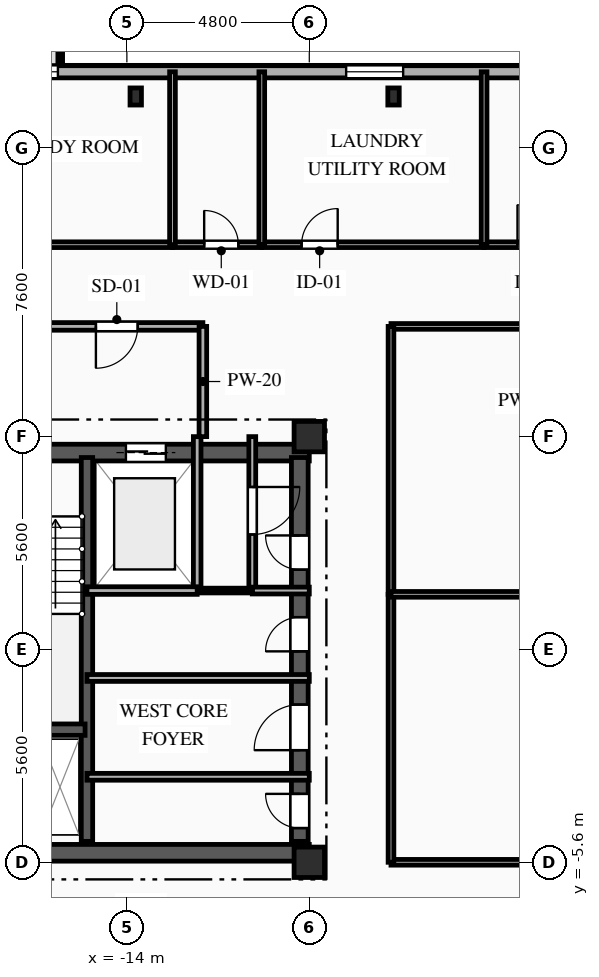
"""IFC4 building model, lengths in metres.
Left out: names, types, materials, properties, quantities, classifications, styles, units other than length and angle.
Written with IfcOpenShell. Run it as: python <this file> out.ifc"""

import sys

from ifc_helpers import new_model, si_unit, direction, frame, frame_2d, origin, origin_2d, place, context, subcontext, project, spatial, rectangle, i_section, extrude, element, fill, save


model = new_model("IFC4")
c1 = context("Model", 3, precision=1e-05, world=origin(), true_north=direction((0.0, 1.0)))
c2 = subcontext(c1, "Body", "Model", "MODEL_VIEW")
j1 = project(units=[si_unit("LENGTHUNIT", "METRE"), si_unit("PLANEANGLEUNIT", "RADIAN")], contexts=[c1])
p1 = place(None, origin())
s1 = spatial("IfcSite", under=j1, at=p1, CompositionType="ELEMENT")
p2 = place(p1, origin())
s2 = spatial("IfcBuilding", under=s1, at=p2, CompositionType="ELEMENT")
p3 = place(p2, frame((0.0, 0.0, 255.1)))
s3 = spatial("IfcBuildingStorey", under=s2, at=p3, CompositionType="ELEMENT", Elevation=255.1)
for number, where, z_axis, x_axis in (
    (1, (-9.2, -5.6, 0.0), (0.0, 0.0, 1.0), (1.0, 0.0, 0.0)),
    (2, (-9.2, 5.6, 0.0), (0.0, 0.0, 1.0), (1.0, 0.0, 0.0)),
):
    element("IfcColumn", number, at=place(p3, frame(where, z_axis=z_axis, x_axis=x_axis)), inside=s3, PredefinedType="COLUMN", context=c2, shape_type="SweptSolid", body=[
        extrude(rectangle(XDim=0.8, YDim=0.8, at=origin_2d()), origin(), (0.0, 0.0, 1.0), 3.35),
    ])
for number, where, z_axis, x_axis in (
    (3, (-6.983, 14.55, 0.0), (0.0, 0.0, 1.0), (1.0, 0.0, 0.0)),
    (4, (-13.767, 14.55, 0.0), (0.0, 0.0, 1.0), (1.0, 0.0, 0.0)),
):
    element("IfcColumn", number, at=place(p3, frame(where, z_axis=z_axis, x_axis=x_axis)), inside=s3, PredefinedType="COLUMN", context=c2, shape_type="SweptSolid", body=[
        extrude(i_section(OverallWidth=0.3, OverallDepth=0.45, WebThickness=0.014, FlangeThickness=0.026, FilletRadius=0.027, at=origin_2d()), origin(), (0.0, 0.0, 1.0), 3.35),
    ])
p4 = place(p3, frame((-21.2, 15.2, 0.0), z_axis=(0.0, 0.0, 1.0), x_axis=(1.0, 0.0, 0.0)))
e5 = element("IfcWall", 5, at=p4, inside=s3, PredefinedType="SOLIDWALL", context=c2, shape_type="SweptSolid", body=[
    extrude(rectangle(XDim=42.0, YDim=0.32, at=frame_2d((21.0, 0.0))), origin(), (0.0, 0.0, 1.0), 3.04),
])
p5 = place(p4, frame((3.735, 0.0, 0.85)))
e6 = element("IfcOpeningElement", 6, at=p5, cuts=e5, PredefinedType="OPENING", context=c2, shape_type="SweptSolid", body=[
    extrude(rectangle(XDim=1.65, YDim=1.85, at=frame_2d((0.825, 0.925))), frame((0.0, 0.17, 0.0), z_axis=(0.0, -1.0, 0.0), x_axis=(1.0, 0.0, 0.0)), (0.0, 0.0, 1.0), 0.34),
])
p6 = place(p4, frame((12.97, 0.0, 0.85)))
e7 = element("IfcOpeningElement", 7, at=p6, cuts=e5, PredefinedType="OPENING", context=c2, shape_type="SweptSolid", body=[
    extrude(rectangle(XDim=1.5, YDim=1.85, at=frame_2d((0.75, 0.925))), frame((0.0, 0.17, 0.0), z_axis=(0.0, -1.0, 0.0), x_axis=(1.0, 0.0, 0.0)), (0.0, 0.0, 1.0), 0.34),
])
p7 = place(p4, frame((19.895, 0.0, 0.85)))
e8 = element("IfcOpeningElement", 8, at=p7, cuts=e5, PredefinedType="OPENING", context=c2, shape_type="SweptSolid", body=[
    extrude(rectangle(XDim=1.65, YDim=1.85, at=frame_2d((0.825, 0.925))), frame((0.0, 0.17, 0.0), z_axis=(0.0, -1.0, 0.0), x_axis=(1.0, 0.0, 0.0)), (0.0, 0.0, 1.0), 0.34),
])
p8 = place(p4, frame((28.095, 0.0, 0.85)))
e9 = element("IfcOpeningElement", 9, at=p8, cuts=e5, PredefinedType="OPENING", context=c2, shape_type="SweptSolid", body=[
    extrude(rectangle(XDim=1.65, YDim=1.85, at=frame_2d((0.825, 0.925))), frame((0.0, 0.17, 0.0), z_axis=(0.0, -1.0, 0.0), x_axis=(1.0, 0.0, 0.0)), (0.0, 0.0, 1.0), 0.34),
])
p9 = place(p4, frame((36.495, 0.0, 0.85)))
e10 = element("IfcOpeningElement", 10, at=p9, cuts=e5, PredefinedType="OPENING", context=c2, shape_type="SweptSolid", body=[
    extrude(rectangle(XDim=1.65, YDim=1.85, at=frame_2d((0.825, 0.925))), frame((0.0, 0.17, 0.0), z_axis=(0.0, -1.0, 0.0), x_axis=(1.0, 0.0, 0.0)), (0.0, 0.0, 1.0), 0.34),
])
p10 = place(p3, frame((-18.8, 5.18, 0.0), z_axis=(0.0, 0.0, 1.0), x_axis=(1.0, 0.0, 0.0)))
e11 = element("IfcWall", 11, at=p10, inside=s3, PredefinedType="SHEAR", context=c2, shape_type="SweptSolid", body=[
    extrude(rectangle(XDim=9.6, YDim=0.44, at=frame_2d((4.8, 0.0))), origin(), (0.0, 0.0, 1.0), 3.04),
])
p11 = place(p10, frame((1.55, 0.0, 0.0)))
e12 = element("IfcOpeningElement", 12, at=p11, cuts=e11, PredefinedType="OPENING", context=c2, shape_type="SweptSolid", body=[
    extrude(rectangle(XDim=1.1, YDim=2.15, at=frame_2d((0.55, 1.075))), frame((0.0, 0.23, 0.0), z_axis=(0.0, -1.0, 0.0), x_axis=(1.0, 0.0, 0.0)), (0.0, 0.0, 1.0), 0.46),
])
p12 = place(p10, frame((4.775, 0.0, 0.0)))
e13 = element("IfcOpeningElement", 13, at=p12, cuts=e11, PredefinedType="OPENING", context=c2, shape_type="SweptSolid", body=[
    extrude(rectangle(XDim=1.05, YDim=2.1, at=frame_2d((0.525, 1.05))), frame((0.0, 0.23, 0.0), z_axis=(0.0, -1.0, 0.0), x_axis=(1.0, 0.0, 0.0)), (0.0, 0.0, 1.0), 0.46),
])
p13 = place(p3, frame((-18.8, -5.35, 0.0), z_axis=(0.0, 0.0, 1.0), x_axis=(1.0, 0.0, 0.0)))
e14 = element("IfcWall", 14, at=p13, inside=s3, PredefinedType="SHEAR", context=c2, shape_type="SweptSolid", body=[
    extrude(rectangle(XDim=9.6, YDim=0.44, at=frame_2d((4.8, 0.0))), origin(), (0.0, 0.0, 1.0), 3.04),
])
p14 = place(p13, frame((1.05, 0.0, 0.0)))
e15 = element("IfcOpeningElement", 15, at=p14, cuts=e14, PredefinedType="OPENING", context=c2, shape_type="SweptSolid", body=[
    extrude(rectangle(XDim=0.9, YDim=2.1, at=frame_2d((0.45, 1.05))), frame((0.0, 0.23, 0.0), z_axis=(0.0, -1.0, 0.0), x_axis=(1.0, 0.0, 0.0)), (0.0, 0.0, 1.0), 0.46),
])
p15 = place(p3, frame((-9.45, -5.05, 0.0), z_axis=(0.0, 0.0, 1.0), x_axis=(0.0, 1.0, 0.0)))
e16 = element("IfcWall", 16, at=p15, inside=s3, PredefinedType="SHEAR", context=c2, shape_type="SweptSolid", body=[
    extrude(rectangle(XDim=10.1, YDim=0.44, at=frame_2d((5.05, 0.0))), origin(), (0.0, 0.0, 1.0), 3.04),
])
p16 = place(p15, frame((7.15, 0.0, 0.0)))
e17 = element("IfcOpeningElement", 17, at=p16, cuts=e16, PredefinedType="OPENING", context=c2, shape_type="SweptSolid", body=[
    extrude(rectangle(XDim=0.9, YDim=2.1, at=frame_2d((0.45, 1.05))), frame((0.0, 0.23, 0.0), z_axis=(0.0, -1.0, 0.0), x_axis=(1.0, 0.0, 0.0)), (0.0, 0.0, 1.0), 0.46),
])
p17 = place(p15, frame((2.4, 0.0, 0.0)))
e18 = element("IfcOpeningElement", 18, at=p17, cuts=e16, PredefinedType="OPENING", context=c2, shape_type="SweptSolid", body=[
    extrude(rectangle(XDim=1.2, YDim=2.15, at=frame_2d((0.6, 1.075))), frame((0.0, 0.23, 0.0), z_axis=(0.0, -1.0, 0.0), x_axis=(1.0, 0.0, 0.0)), (0.0, 0.0, 1.0), 0.46),
])
p18 = place(p15, frame((0.35, 0.0, 0.0)))
e19 = element("IfcOpeningElement", 19, at=p18, cuts=e16, PredefinedType="OPENING", context=c2, shape_type="SweptSolid", body=[
    extrude(rectangle(XDim=0.9, YDim=2.1, at=frame_2d((0.45, 1.05))), frame((0.0, 0.23, 0.0), z_axis=(0.0, -1.0, 0.0), x_axis=(1.0, 0.0, 0.0)), (0.0, 0.0, 1.0), 0.46),
])
p19 = place(p15, frame((5.0, 0.0, 0.0)))
e20 = element("IfcOpeningElement", 20, at=p19, cuts=e16, PredefinedType="OPENING", context=c2, shape_type="SweptSolid", body=[
    extrude(rectangle(XDim=0.9, YDim=2.1, at=frame_2d((0.45, 1.05))), frame((0.0, 0.23, 0.0), z_axis=(0.0, -1.0, 0.0), x_axis=(1.0, 0.0, 0.0)), (0.0, 0.0, 1.0), 0.46),
])
p20 = place(p3, frame((-15.05, -5.05, 0.0), z_axis=(0.0, 0.0, 1.0), x_axis=(0.0, 1.0, 0.0)))
e21 = element("IfcWall", 21, at=p20, inside=s3, PredefinedType="SHEAR", context=c2, shape_type="SweptSolid", body=[
    extrude(rectangle(XDim=10.1, YDim=0.3, at=frame_2d((5.05, 0.0))), origin(), (0.0, 0.0, 1.0), 3.04),
])
p21 = place(p3, frame((-18.28, -2.11, 0.0), z_axis=(0.0, 0.0, 1.0), x_axis=(1.0, 0.0, 0.0)))
e22 = element("IfcWall", 22, at=p21, inside=s3, PredefinedType="SHEAR", context=c2, shape_type="SweptSolid", body=[
    extrude(rectangle(XDim=3.18, YDim=0.3, at=frame_2d((1.59, 0.0))), origin(), (0.0, 0.0, 1.0), 3.04),
])
p22 = place(p3, frame((-12.15, 1.55, 0.0), z_axis=(0.0, 0.0, 1.0), x_axis=(0.0, 1.0, 0.0)))
e23 = element("IfcWall", 23, at=p22, inside=s3, PredefinedType="PARTITIONING", context=c2, shape_type="SweptSolid", body=[
    extrude(rectangle(XDim=4.05, YDim=0.2, at=frame_2d((2.025, 0.0))), origin(), (0.0, 0.0, 1.0), 3.04),
])
p23 = place(p3, frame((-12.0, 8.5, 0.0), z_axis=(0.0, 0.0, 1.0), x_axis=(-1.0, 0.0, 0.0)))
e24 = element("IfcWall", 24, at=p23, inside=s3, PredefinedType="PARTITIONING", context=c2, shape_type="SweptSolid", body=[
    extrude(rectangle(XDim=6.8, YDim=0.2, at=frame_2d((3.4, 0.0))), origin(), (0.0, 0.0, 1.0), 3.04),
])
p24 = place(p23, frame((1.715, 0.0, 0.0)))
e25 = element("IfcOpeningElement", 25, at=p24, cuts=e24, PredefinedType="OPENING", context=c2, shape_type="SweptSolid", body=[
    extrude(rectangle(XDim=1.1, YDim=2.15, at=frame_2d((0.55, 1.075))), frame((0.0, 0.11, 0.0), z_axis=(0.0, -1.0, 0.0), x_axis=(1.0, 0.0, 0.0)), (0.0, 0.0, 1.0), 0.22),
])
p25 = place(p3, frame((-12.0, 5.6, 0.0), z_axis=(0.0, 0.0, 1.0), x_axis=(0.0, 1.0, 0.0)))
e26 = element("IfcWall", 26, at=p25, inside=s3, PredefinedType="PARTITIONING", context=c2, shape_type="SweptSolid", body=[
    extrude(rectangle(XDim=2.9, YDim=0.2, at=frame_2d((1.45, 0.0))), origin(), (0.0, 0.0, 1.0), 3.04),
])
p26 = place(p3, frame((-10.7, 5.6, 0.0), z_axis=(0.0, 0.0, 1.0), x_axis=(0.0, -1.0, 0.0)))
e27 = element("IfcWall", 27, at=p26, inside=s3, PredefinedType="PARTITIONING", context=c2, shape_type="SweptSolid", body=[
    extrude(rectangle(XDim=4.05, YDim=0.18, at=frame_2d((2.025, 0.0))), origin(), (0.0, 0.0, 1.0), 3.04),
])
p27 = place(p26, frame((1.325, 0.0, 0.0)))
e28 = element("IfcOpeningElement", 28, at=p27, cuts=e27, PredefinedType="OPENING", context=c2, shape_type="SweptSolid", body=[
    extrude(rectangle(XDim=1.25, YDim=2.2, at=frame_2d((0.625, 1.1))), frame((0.0, 0.1, 0.0), z_axis=(0.0, -1.0, 0.0), x_axis=(1.0, 0.0, 0.0)), (0.0, 0.0, 1.0), 0.2),
])
p28 = place(p3, frame((-10.7, 1.55, 0.0), z_axis=(0.0, 0.0, 1.0), x_axis=(1.0, 0.0, 0.0)))
e29 = element("IfcWall", 29, at=p28, inside=s3, PredefinedType="PARTITIONING", context=c2, shape_type="SweptSolid", body=[
    extrude(rectangle(XDim=1.5, YDim=0.18, at=frame_2d((0.75, 0.0))), origin(), (0.0, 0.0, 1.0), 3.04),
])
p29 = place(p3, frame((-12.15, 1.55, 0.0), z_axis=(0.0, 0.0, 1.0), x_axis=(1.0, 0.0, 0.0)))
e30 = element("IfcWall", 30, at=p29, inside=s3, PredefinedType="PARTITIONING", context=c2, shape_type="SweptSolid", body=[
    extrude(rectangle(XDim=1.45, YDim=0.125, at=frame_2d((0.725, 0.0))), origin(), (0.0, 0.0, 1.0), 3.04),
])
p30 = place(p3, frame((-15.05, -3.35, 0.0), z_axis=(0.0, 0.0, 1.0), x_axis=(1.0, 0.0, 0.0)))
e31 = element("IfcWall", 31, at=p30, inside=s3, PredefinedType="PARTITIONING", context=c2, shape_type="SweptSolid", body=[
    extrude(rectangle(XDim=5.85, YDim=0.18, at=frame_2d((2.925, 0.0))), origin(), (0.0, 0.0, 1.0), 2.755),
])
p31 = place(p3, frame((-9.2, -0.75, 0.0), z_axis=(0.0, 0.0, 1.0), x_axis=(-1.0, 0.0, 0.0)))
e32 = element("IfcWall", 32, at=p31, inside=s3, PredefinedType="PARTITIONING", context=c2, shape_type="SweptSolid", body=[
    extrude(rectangle(XDim=5.85, YDim=0.18, at=frame_2d((2.925, 0.0))), origin(), (0.0, 0.0, 1.0), 3.04),
])
p32 = place(p3, frame((-20.5, 10.65, 0.0), z_axis=(0.0, 0.0, 1.0), x_axis=(1.0, 0.0, 0.0)))
e33 = element("IfcWall", 33, at=p32, inside=s3, PredefinedType="PARTITIONING", context=c2, shape_type="SweptSolid", body=[
    extrude(rectangle(XDim=7.7, YDim=0.15, at=frame_2d((3.85, 0.0))), origin(), (0.0, 0.0, 1.0), 3.04),
])
p33 = place(p32, frame((2.639, 0.0, 0.0)))
e34 = element("IfcOpeningElement", 34, at=p33, cuts=e33, PredefinedType="OPENING", context=c2, shape_type="SweptSolid", body=[
    extrude(rectangle(XDim=1.05, YDim=2.15, at=frame_2d((0.525, 1.075))), frame((0.0, 0.085, 0.0), z_axis=(0.0, -1.0, 0.0), x_axis=(1.0, 0.0, 0.0)), (0.0, 0.0, 1.0), 0.17),
])
p34 = place(p3, frame((-12.8, 10.65, 0.0), z_axis=(0.0, 0.0, 1.0), x_axis=(1.0, 0.0, 0.0)))
e35 = element("IfcWall", 35, at=p34, inside=s3, PredefinedType="PLUMBINGWALL", context=c2, shape_type="SweptSolid", body=[
    extrude(rectangle(XDim=2.35, YDim=0.15, at=frame_2d((1.175, 0.0))), origin(), (0.0, 0.0, 1.0), 3.04),
])
p35 = place(p34, frame((0.834, 0.0, 0.0)))
e36 = element("IfcOpeningElement", 36, at=p35, cuts=e35, PredefinedType="OPENING", context=c2, shape_type="SweptSolid", body=[
    extrude(rectangle(XDim=0.9, YDim=2.1, at=frame_2d((0.45, 1.05))), frame((0.0, 0.085, 0.0), z_axis=(0.0, -1.0, 0.0), x_axis=(1.0, 0.0, 0.0)), (0.0, 0.0, 1.0), 0.17),
])
p36 = place(p3, frame((-10.45, 10.65, 0.0), z_axis=(0.0, 0.0, 1.0), x_axis=(1.0, 0.0, 0.0)))
e37 = element("IfcWall", 37, at=p36, inside=s3, PredefinedType="PARTITIONING", context=c2, shape_type="SweptSolid", body=[
    extrude(rectangle(XDim=5.85, YDim=0.15, at=frame_2d((2.925, 0.0))), origin(), (0.0, 0.0, 1.0), 3.04),
])
p37 = place(p36, frame((1.048, 0.0, 0.0)))
e38 = element("IfcOpeningElement", 38, at=p37, cuts=e37, PredefinedType="OPENING", context=c2, shape_type="SweptSolid", body=[
    extrude(rectangle(XDim=0.95, YDim=2.1, at=frame_2d((0.475, 1.05))), frame((0.0, 0.085, 0.0), z_axis=(0.0, -1.0, 0.0), x_axis=(1.0, 0.0, 0.0)), (0.0, 0.0, 1.0), 0.17),
])
p38 = place(p3, frame((-4.6, 10.65, 0.0), z_axis=(0.0, 0.0, 1.0), x_axis=(1.0, 0.0, 0.0)))
e39 = element("IfcWall", 39, at=p38, inside=s3, PredefinedType="PARTITIONING", context=c2, shape_type="SweptSolid", body=[
    extrude(rectangle(XDim=4.6, YDim=0.15, at=frame_2d((2.3, 0.0))), origin(), (0.0, 0.0, 1.0), 3.04),
])
p39 = place(p38, frame((0.879, 0.0, 0.0)))
e40 = element("IfcOpeningElement", 40, at=p39, cuts=e39, PredefinedType="OPENING", context=c2, shape_type="SweptSolid", body=[
    extrude(rectangle(XDim=1.05, YDim=2.15, at=frame_2d((0.525, 1.075))), frame((0.0, 0.085, 0.0), z_axis=(0.0, -1.0, 0.0), x_axis=(1.0, 0.0, 0.0)), (0.0, 0.0, 1.0), 0.17),
])
p40 = place(p3, frame((0.0, 8.5, 0.0), z_axis=(0.0, 0.0, 1.0), x_axis=(-1.0, 0.0, 0.0)))
e41 = element("IfcWall", 41, at=p40, inside=s3, PredefinedType="PARTITIONING", context=c2, shape_type="SweptSolid", body=[
    extrude(rectangle(XDim=7.05, YDim=0.15, at=frame_2d((3.525, 0.0))), origin(), (0.0, 0.0, 1.0), 3.04),
])
p41 = place(p40, frame((2.395, 0.0, 0.0)))
e42 = element("IfcOpeningElement", 42, at=p41, cuts=e41, PredefinedType="OPENING", context=c2, shape_type="SweptSolid", body=[
    extrude(rectangle(XDim=1.05, YDim=2.15, at=frame_2d((0.525, 1.075))), frame((0.0, 0.085, 0.0), z_axis=(0.0, -1.0, 0.0), x_axis=(1.0, 0.0, 0.0)), (0.0, 0.0, 1.0), 0.17),
])
p42 = place(p3, frame((-7.05, -5.6, 0.0), z_axis=(0.0, 0.0, 1.0), x_axis=(1.0, 0.0, 0.0)))
e43 = element("IfcWall", 43, at=p42, inside=s3, PredefinedType="PARTITIONING", context=c2, shape_type="SweptSolid", body=[
    extrude(rectangle(XDim=7.05, YDim=0.15, at=frame_2d((3.525, 0.0))), origin(), (0.0, 0.0, 1.0), 2.525),
])
p43 = place(p42, frame((4.815, 0.0, 0.0)))
e44 = element("IfcOpeningElement", 44, at=p43, cuts=e43, PredefinedType="OPENING", context=c2, shape_type="SweptSolid", body=[
    extrude(rectangle(XDim=1.05, YDim=2.15, at=frame_2d((0.525, 1.075))), frame((0.0, 0.085, 0.0), z_axis=(0.0, -1.0, 0.0), x_axis=(1.0, 0.0, 0.0)), (0.0, 0.0, 1.0), 0.17),
])
for number, where, z_axis, x_axis in (
    (45, (-7.05, 1.45, 0.0), (0.0, 0.0, 1.0), (0.0, -1.0, 0.0)),
    (46, (-7.05, 8.5, 0.0), (0.0, 0.0, 1.0), (0.0, -1.0, 0.0)),
):
    element("IfcWall", number, at=place(p3, frame(where, z_axis=z_axis, x_axis=x_axis)), inside=s3, PredefinedType="PARTITIONING", context=c2, shape_type="SweptSolid", body=[
        extrude(rectangle(XDim=7.05, YDim=0.15, at=frame_2d((3.525, 0.0))), origin(), (0.0, 0.0, 1.0), 3.04),
    ])
for number, where, z_axis, x_axis in (
    (47, (-12.8, 15.2, 0.0), (0.0, 0.0, 1.0), (0.0, -1.0, 0.0)),
    (48, (-10.45, 15.2, 0.0), (0.0, 0.0, 1.0), (0.0, -1.0, 0.0)),
):
    element("IfcWall", number, at=place(p3, frame(where, z_axis=z_axis, x_axis=x_axis)), inside=s3, PredefinedType="PLUMBINGWALL", context=c2, shape_type="SweptSolid", body=[
        extrude(rectangle(XDim=4.55, YDim=0.15, at=frame_2d((2.275, 0.0))), origin(), (0.0, 0.0, 1.0), 3.04),
    ])
p44 = place(p3, frame((-4.6, 15.2, 0.0), z_axis=(0.0, 0.0, 1.0), x_axis=(0.0, -1.0, 0.0)))
e49 = element("IfcWall", 49, at=p44, inside=s3, PredefinedType="PARTITIONING", context=c2, shape_type="SweptSolid", body=[
    extrude(rectangle(XDim=4.55, YDim=0.15, at=frame_2d((2.275, 0.0))), origin(), (0.0, 0.0, 1.0), 3.04),
])
p45 = place(p3, frame((-7.05, 1.45, 0.0), z_axis=(0.0, 0.0, 1.0), x_axis=(1.0, 0.0, 0.0)))
e50 = element("IfcWall", 50, at=p45, inside=s3, PredefinedType="PARTITIONING", context=c2, shape_type="SweptSolid", body=[
    extrude(rectangle(XDim=14.1, YDim=0.15, at=frame_2d((7.05, 0.0))), origin(), (0.0, 0.0, 1.0), 3.04),
])
p46 = place(p3, frame((-15.05, 1.55, 0.0), z_axis=(0.0, 0.0, 1.0), x_axis=(1.0, 0.0, 0.0)))
e51 = element("IfcWall", 51, at=p46, inside=s3, PredefinedType="PARTITIONING", context=c2, shape_type="SweptSolid", body=[
    extrude(rectangle(XDim=2.9, YDim=0.2, at=frame_2d((1.45, 0.0))), origin(), (0.0, 0.0, 1.0), 3.04),
])
p47 = place(p5, origin())
e52 = element("IfcWindow", 52, at=p47, inside=s3, PartitioningType="SINGLE_PANEL", PredefinedType="WINDOW", context=c2, shape_type="SweptSolid", body=[
    extrude(rectangle(XDim=1.65, YDim=1.85, at=frame_2d((0.825, 0.925))), frame((0.0, 0.03, 0.0), z_axis=(0.0, -1.0, 0.0), x_axis=(1.0, 0.0, 0.0)), (0.0, 0.0, 1.0), 0.06),
])
fill(e6, e52)
p48 = place(p6, origin())
e53 = element("IfcWindow", 53, at=p48, inside=s3, PartitioningType="SINGLE_PANEL", PredefinedType="WINDOW", context=c2, shape_type="SweptSolid", body=[
    extrude(rectangle(XDim=1.5, YDim=1.85, at=frame_2d((0.75, 0.925))), frame((0.0, 0.03, 0.0), z_axis=(0.0, -1.0, 0.0), x_axis=(1.0, 0.0, 0.0)), (0.0, 0.0, 1.0), 0.06),
])
fill(e7, e53)
p49 = place(p12, origin())
e54 = element("IfcDoor", 54, at=p49, inside=s3, OperationType="DOUBLE_DOOR_SLIDING", PredefinedType="DOOR", context=c2, shape_type="SweptSolid", body=[
    extrude(rectangle(XDim=1.05, YDim=2.1, at=frame_2d((0.525, 1.05))), frame((0.0, 0.025, 0.0), z_axis=(0.0, -1.0, 0.0), x_axis=(1.0, 0.0, 0.0)), (0.0, 0.0, 1.0), 0.05),
])
fill(e13, e54)
p50 = place(p24, origin())
e55 = element("IfcDoor", 55, at=p50, inside=s3, OperationType="SINGLE_SWING_RIGHT", PredefinedType="DOOR", context=c2, shape_type="SweptSolid", body=[
    extrude(rectangle(XDim=1.1, YDim=2.15, at=frame_2d((0.55, 1.075))), frame((0.0, 0.025, 0.0), z_axis=(0.0, -1.0, 0.0), x_axis=(1.0, 0.0, 0.0)), (0.0, 0.0, 1.0), 0.05),
])
fill(e25, e55)
p51 = place(p27, origin())
e56 = element("IfcDoor", 56, at=p51, inside=s3, OperationType="SINGLE_SWING_LEFT", PredefinedType="DOOR", context=c2, shape_type="SweptSolid", body=[
    extrude(rectangle(XDim=1.25, YDim=2.2, at=frame_2d((0.625, 1.1))), frame((0.0, 0.025, 0.0), z_axis=(0.0, -1.0, 0.0), x_axis=(1.0, 0.0, 0.0)), (0.0, 0.0, 1.0), 0.05),
])
fill(e28, e56)
p52 = place(p16, origin())
e57 = element("IfcDoor", 57, at=p52, inside=s3, OperationType="SINGLE_SWING_RIGHT", PredefinedType="DOOR", context=c2, shape_type="SweptSolid", body=[
    extrude(rectangle(XDim=0.9, YDim=2.1, at=frame_2d((0.45, 1.05))), frame((0.0, 0.025, 0.0), z_axis=(0.0, -1.0, 0.0), x_axis=(1.0, 0.0, 0.0)), (0.0, 0.0, 1.0), 0.05),
])
fill(e17, e57)
p53 = place(p17, origin())
e58 = element("IfcDoor", 58, at=p53, inside=s3, OperationType="SINGLE_SWING_LEFT", PredefinedType="DOOR", context=c2, shape_type="SweptSolid", body=[
    extrude(rectangle(XDim=1.2, YDim=2.15, at=frame_2d((0.6, 1.075))), frame((0.0, 0.025, 0.0), z_axis=(0.0, -1.0, 0.0), x_axis=(1.0, 0.0, 0.0)), (0.0, 0.0, 1.0), 0.05),
])
fill(e18, e58)
p54 = place(p18, origin())
e59 = element("IfcDoor", 59, at=p54, inside=s3, OperationType="SINGLE_SWING_RIGHT", PredefinedType="DOOR", context=c2, shape_type="SweptSolid", body=[
    extrude(rectangle(XDim=0.9, YDim=2.1, at=frame_2d((0.45, 1.05))), frame((0.0, 0.025, 0.0), z_axis=(0.0, -1.0, 0.0), x_axis=(1.0, 0.0, 0.0)), (0.0, 0.0, 1.0), 0.05),
])
fill(e19, e59)
p55 = place(p19, origin())
e60 = element("IfcDoor", 60, at=p55, inside=s3, OperationType="SINGLE_SWING_LEFT", PredefinedType="DOOR", context=c2, shape_type="SweptSolid", body=[
    extrude(rectangle(XDim=0.9, YDim=2.1, at=frame_2d((0.45, 1.05))), frame((0.0, 0.025, 0.0), z_axis=(0.0, -1.0, 0.0), x_axis=(1.0, 0.0, 0.0)), (0.0, 0.0, 1.0), 0.05),
])
fill(e20, e60)
p56 = place(p35, origin())
e61 = element("IfcDoor", 61, at=p56, inside=s3, OperationType="SINGLE_SWING_LEFT", PredefinedType="DOOR", context=c2, shape_type="SweptSolid", body=[
    extrude(rectangle(XDim=0.9, YDim=2.1, at=frame_2d((0.45, 1.05))), frame((0.0, 0.025, 0.0), z_axis=(0.0, -1.0, 0.0), x_axis=(1.0, 0.0, 0.0)), (0.0, 0.0, 1.0), 0.05),
])
fill(e36, e61)
p57 = place(p37, origin())
e62 = element("IfcDoor", 62, at=p57, inside=s3, OperationType="SINGLE_SWING_RIGHT", PredefinedType="DOOR", context=c2, shape_type="SweptSolid", body=[
    extrude(rectangle(XDim=0.95, YDim=2.1, at=frame_2d((0.475, 1.05))), frame((0.0, 0.025, 0.0), z_axis=(0.0, -1.0, 0.0), x_axis=(1.0, 0.0, 0.0)), (0.0, 0.0, 1.0), 0.05),
])
fill(e38, e62)
p58 = place(p39, origin())
e63 = element("IfcDoor", 63, at=p58, inside=s3, OperationType="SINGLE_SWING_LEFT", PredefinedType="DOOR", context=c2, shape_type="SweptSolid", body=[
    extrude(rectangle(XDim=1.05, YDim=2.15, at=frame_2d((0.525, 1.075))), frame((0.0, 0.025, 0.0), z_axis=(0.0, -1.0, 0.0), x_axis=(1.0, 0.0, 0.0)), (0.0, 0.0, 1.0), 0.05),
])
fill(e40, e63)
save(model, sys.argv[1])
